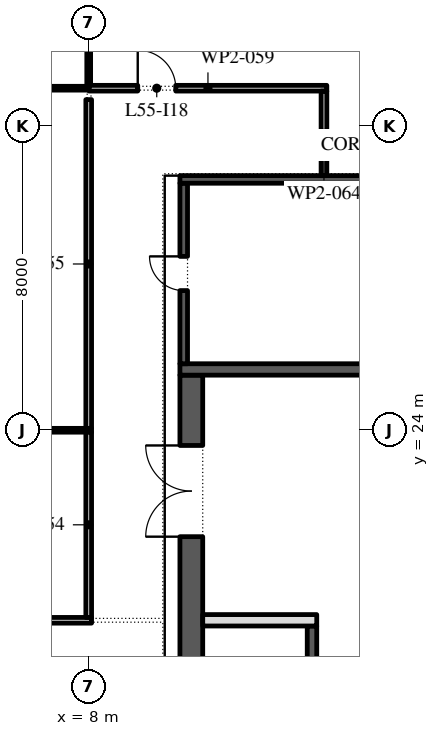
"""IFC4 building model, lengths in metres.
Left out: names, types, materials, properties, quantities, classifications, styles, units other than length and angle.
Written with IfcOpenShell. Run it as: python <this file> out.ifc"""

import sys

from ifc_helpers import new_model, si_unit, direction, frame, frame_2d, origin, place, context, subcontext, project, spatial, rectangle, extrude, element, fill, save


model = new_model("IFC4")
c1 = context("Model", 3, precision=1e-05, world=origin(), true_north=direction((0.0, 1.0)))
c2 = subcontext(c1, "Body", "Model", "MODEL_VIEW")
j1 = project(units=[si_unit("LENGTHUNIT", "METRE"), si_unit("PLANEANGLEUNIT", "RADIAN")], contexts=[c1])
p1 = place(None, origin())
s1 = spatial("IfcSite", under=j1, at=p1, CompositionType="ELEMENT")
p2 = place(p1, origin())
s2 = spatial("IfcBuilding", under=s1, at=p2, CompositionType="ELEMENT")
p3 = place(p2, frame((0.0, 0.0, 255.6)))
s3 = spatial("IfcBuildingStorey", under=s2, at=p3, CompositionType="ELEMENT", Elevation=255.6)
p4 = place(p3, frame((10.7, -2.45, 0.0), z_axis=(0.0, 0.0, 1.0), x_axis=(0.0, 1.0, 0.0)))
e1 = element("IfcWall", 1, at=p4, inside=s3, PredefinedType="SHEAR", context=c2, shape_type="SweptSolid", body=[
    extrude(rectangle(XDim=27.9, YDim=0.6, at=frame_2d((13.95, 0.0))), origin(), (0.0, 0.0, 1.0), 4.0),
])
p5 = place(p4, frame((23.65, 0.0, 0.0)))
e2 = element("IfcOpeningElement", 2, at=p5, cuts=e1, PredefinedType="OPENING", context=c2, shape_type="SweptSolid", body=[
    extrude(rectangle(XDim=2.4, YDim=2.1, at=frame_2d((1.2, 1.05))), frame((0.0, 0.31, 0.0), z_axis=(0.0, -1.0, 0.0), x_axis=(1.0, 0.0, 0.0)), (0.0, 0.0, 1.0), 0.62),
])
p6 = place(p4, frame((1.087, 0.0, 0.0)))
e3 = element("IfcOpeningElement", 3, at=p6, cuts=e1, PredefinedType="OPENING", context=c2, shape_type="SweptSolid", body=[
    extrude(rectangle(XDim=0.9, YDim=2.1, at=frame_2d((0.45, 1.05))), frame((0.0, 0.31, 0.0), z_axis=(0.0, -1.0, 0.0), x_axis=(1.0, 0.0, 0.0)), (0.0, 0.0, 1.0), 0.62),
])
p7 = place(p4, frame((4.262, 0.0, 0.0)))
e4 = element("IfcOpeningElement", 4, at=p7, cuts=e1, PredefinedType="OPENING", context=c2, shape_type="SweptSolid", body=[
    extrude(rectangle(XDim=1.0, YDim=2.1, at=frame_2d((0.5, 1.05))), frame((0.0, 0.31, 0.0), z_axis=(0.0, -1.0, 0.0), x_axis=(1.0, 0.0, 0.0)), (0.0, 0.0, 1.0), 0.62),
])
p8 = place(p3, frame((10.4, 25.6, 0.0), z_axis=(0.0, 0.0, 1.0), x_axis=(1.0, 0.0, 0.0)))
e5 = element("IfcWall", 5, at=p8, inside=s3, PredefinedType="SHEAR", context=c2, shape_type="SweptSolid", body=[
    extrude(rectangle(XDim=11.2, YDim=0.3, at=frame_2d((5.6, 0.0))), origin(), (0.0, 0.0, 1.0), 4.0),
])
p9 = place(p3, frame((13.875, -2.45, 0.0), z_axis=(0.0, 0.0, 1.0), x_axis=(0.0, 1.0, 0.0)))
e6 = element("IfcWall", 6, at=p9, inside=s3, PredefinedType="SHEAR", context=c2, shape_type="SweptSolid", body=[
    extrude(rectangle(XDim=21.3, YDim=0.25, at=frame_2d((10.65, 0.0))), origin(), (0.0, 0.0, 1.0), 4.0),
])
p10 = place(p9, frame((16.261, 0.0, 0.0)))
e7 = element("IfcOpeningElement", 7, at=p10, cuts=e6, PredefinedType="OPENING", context=c2, shape_type="SweptSolid", body=[
    extrude(rectangle(XDim=0.9, YDim=2.1, at=frame_2d((0.45, 1.05))), frame((0.0, 0.135, 0.0), z_axis=(0.0, -1.0, 0.0), x_axis=(1.0, 0.0, 0.0)), (0.0, 0.0, 1.0), 0.27),
])
p11 = place(p9, frame((19.325, 0.0, 0.0)))
e8 = element("IfcOpeningElement", 8, at=p11, cuts=e6, PredefinedType="OPENING", context=c2, shape_type="SweptSolid", body=[
    extrude(rectangle(XDim=0.9, YDim=2.1, at=frame_2d((0.45, 1.05))), frame((0.0, 0.135, 0.0), z_axis=(0.0, -1.0, 0.0), x_axis=(1.0, 0.0, 0.0)), (0.0, 0.0, 1.0), 0.27),
])
p12 = place(p9, frame((6.971, 0.0, 0.0)))
e9 = element("IfcOpeningElement", 9, at=p12, cuts=e6, PredefinedType="OPENING", context=c2, shape_type="SweptSolid", body=[
    extrude(rectangle(XDim=1.1, YDim=2.1, at=frame_2d((0.55, 1.05))), frame((0.0, 0.135, 0.0), z_axis=(0.0, -1.0, 0.0), x_axis=(1.0, 0.0, 0.0)), (0.0, 0.0, 1.0), 0.27),
])
p13 = place(p9, frame((9.114, 0.0, 0.0)))
e10 = element("IfcOpeningElement", 10, at=p13, cuts=e6, PredefinedType="OPENING", context=c2, shape_type="SweptSolid", body=[
    extrude(rectangle(XDim=1.1, YDim=2.1, at=frame_2d((0.55, 1.05))), frame((0.0, 0.135, 0.0), z_axis=(0.0, -1.0, 0.0), x_axis=(1.0, 0.0, 0.0)), (0.0, 0.0, 1.0), 0.27),
])
p14 = place(p9, frame((11.257, 0.0, 0.0)))
e11 = element("IfcOpeningElement", 11, at=p14, cuts=e6, PredefinedType="OPENING", context=c2, shape_type="SweptSolid", body=[
    extrude(rectangle(XDim=1.1, YDim=2.1, at=frame_2d((0.55, 1.05))), frame((0.0, 0.135, 0.0), z_axis=(0.0, -1.0, 0.0), x_axis=(1.0, 0.0, 0.0)), (0.0, 0.0, 1.0), 0.27),
])
p15 = place(p9, frame((13.4, 0.0, 0.0)))
e12 = element("IfcOpeningElement", 12, at=p15, cuts=e6, PredefinedType="OPENING", context=c2, shape_type="SweptSolid", body=[
    extrude(rectangle(XDim=1.1, YDim=2.1, at=frame_2d((0.55, 1.05))), frame((0.0, 0.135, 0.0), z_axis=(0.0, -1.0, 0.0), x_axis=(1.0, 0.0, 0.0)), (0.0, 0.0, 1.0), 0.27),
])
p16 = place(p3, frame((11.0, 19.0, 0.0), z_axis=(0.0, 0.0, 1.0), x_axis=(1.0, 0.0, 0.0)))
e13 = element("IfcWall", 13, at=p16, inside=s3, PredefinedType="PARTITIONING", context=c2, shape_type="SweptSolid", body=[
    extrude(rectangle(XDim=3.0, YDim=0.3, at=frame_2d((1.5, 0.0))), origin(), (0.0, 0.0, 1.0), 4.0),
])
p17 = place(p3, frame((10.5, 25.75, 0.0), z_axis=(0.0, 0.0, 1.0), x_axis=(0.0, 1.0, 0.0)))
e14 = element("IfcWall", 14, at=p17, inside=s3, PredefinedType="SHEAR", context=c2, shape_type="SweptSolid", body=[
    extrude(rectangle(XDim=4.75, YDim=0.2, at=frame_2d((2.375, 0.0))), origin(), (0.0, 0.0, 1.0), 4.0),
])
p18 = place(p17, frame((1.925, 0.0, 0.0)))
e15 = element("IfcOpeningElement", 15, at=p18, cuts=e14, PredefinedType="OPENING", context=c2, shape_type="SweptSolid", body=[
    extrude(rectangle(XDim=0.9, YDim=2.1, at=frame_2d((0.45, 1.05))), frame((0.0, 0.11, 0.0), z_axis=(0.0, -1.0, 0.0), x_axis=(1.0, 0.0, 0.0)), (0.0, 0.0, 1.0), 0.22),
])
p19 = place(p3, frame((10.4, 30.6, 0.0), z_axis=(0.0, 0.0, 1.0), x_axis=(1.0, 0.0, 0.0)))
e16 = element("IfcWall", 16, at=p19, inside=s3, PredefinedType="SHEAR", context=c2, shape_type="SweptSolid", body=[
    extrude(rectangle(XDim=11.2, YDim=0.2, at=frame_2d((5.6, 0.0))), origin(), (0.0, 0.0, 1.0), 4.0),
])
p20 = place(p3, frame((1.025, 19.0, 0.0), z_axis=(0.0, 0.0, 1.0), x_axis=(1.0, 0.0, 0.0)))
e17 = element("IfcWall", 17, at=p20, inside=s3, PredefinedType="PARTITIONING", context=c2, shape_type="SweptSolid", body=[
    extrude(rectangle(XDim=7.05, YDim=0.15, at=frame_2d((3.525, 0.0))), origin(), (0.0, 0.0, 1.0), 4.0),
])
p21 = place(p20, frame((3.825, 0.0, 0.0)))
e18 = element("IfcOpeningElement", 18, at=p21, cuts=e17, PredefinedType="OPENING", context=c2, shape_type="SweptSolid", body=[
    extrude(rectangle(XDim=1.0, YDim=2.1, at=frame_2d((0.5, 1.05))), frame((0.0, 0.085, 0.0), z_axis=(0.0, -1.0, 0.0), x_axis=(1.0, 0.0, 0.0)), (0.0, 0.0, 1.0), 0.17),
])
p22 = place(p3, frame((1.175, 24.0, 0.0), z_axis=(0.0, 0.0, 1.0), x_axis=(1.0, 0.0, 0.0)))
e19 = element("IfcWall", 19, at=p22, inside=s3, PredefinedType="PARTITIONING", context=c2, shape_type="SweptSolid", body=[
    extrude(rectangle(XDim=6.9, YDim=0.1, at=frame_2d((3.45, 0.0))), origin(), (0.0, 0.0, 1.0), 4.0),
])
p23 = place(p3, frame((8.0, 19.075, 0.0), z_axis=(0.0, 0.0, 1.0), x_axis=(0.0, 1.0, 0.0)))
e20 = element("IfcWall", 20, at=p23, inside=s3, PredefinedType="PARTITIONING", context=c2, shape_type="SweptSolid", body=[
    extrude(rectangle(XDim=4.875, YDim=0.15, at=frame_2d((2.438, 0.0))), origin(), (0.0, 0.0, 1.0), 4.0),
])
p24 = place(p3, frame((8.0, 24.05, 0.0), z_axis=(0.0, 0.0, 1.0), x_axis=(0.0, 1.0, 0.0)))
e21 = element("IfcWall", 21, at=p24, inside=s3, PredefinedType="PARTITIONING", context=c2, shape_type="SweptSolid", body=[
    extrude(rectangle(XDim=8.65, YDim=0.15, at=frame_2d((4.325, 0.0))), origin(), (0.0, 0.0, 1.0), 4.0),
])
p25 = place(p3, frame((8.05, 33.0, 0.0), z_axis=(0.0, 0.0, 1.0), x_axis=(-1.0, 0.0, 0.0)))
e22 = element("IfcWall", 22, at=p25, inside=s3, PredefinedType="PARTITIONING", context=c2, shape_type="SweptSolid", body=[
    extrude(rectangle(XDim=6.875, YDim=0.1, at=frame_2d((3.438, 0.0))), origin(), (0.0, 0.0, 1.0), 4.0),
])
p26 = place(p3, frame((8.0, 33.05, 0.0), z_axis=(0.0, 0.0, 1.0), x_axis=(0.0, 1.0, 0.0)))
e23 = element("IfcWall", 23, at=p26, inside=s3, PredefinedType="PARTITIONING", context=c2, shape_type="SweptSolid", body=[
    extrude(rectangle(XDim=6.5, YDim=0.1, at=frame_2d((3.25, 0.0))), origin(), (0.0, 0.0, 1.0), 4.0),
])
p27 = place(p3, frame((8.01, 33.0, 0.0), z_axis=(0.0, 0.0, 1.0), x_axis=(1.0, 0.0, 0.0)))
e24 = element("IfcWall", 24, at=p27, inside=s3, PredefinedType="PARTITIONING", context=c2, shape_type="SweptSolid", body=[
    extrude(rectangle(XDim=6.255, YDim=0.15, at=frame_2d((3.127, 0.0))), origin(), (0.0, 0.0, 1.0), 4.0),
])
p28 = place(p27, frame((1.28, 0.0, 0.0)))
e25 = element("IfcOpeningElement", 25, at=p28, cuts=e24, PredefinedType="OPENING", context=c2, shape_type="SweptSolid", body=[
    extrude(rectangle(XDim=1.0, YDim=2.1, at=frame_2d((0.5, 1.05))), frame((0.0, 0.085, 0.0), z_axis=(0.0, -1.0, 0.0), x_axis=(1.0, 0.0, 0.0)), (0.0, 0.0, 1.0), 0.17),
])
p29 = place(p3, frame((14.19, 32.925, 0.0), z_axis=(0.0, 0.0, 1.0), x_axis=(0.0, -1.0, 0.0)))
e26 = element("IfcWall", 26, at=p29, inside=s3, PredefinedType="PARTITIONING", context=c2, shape_type="SweptSolid", body=[
    extrude(rectangle(XDim=2.225, YDim=0.15, at=frame_2d((1.113, 0.0))), origin(), (0.0, 0.0, 1.0), 4.0),
])
p30 = place(p5, origin())
e27 = element("IfcDoor", 27, at=p30, inside=s3, OperationType="DOUBLE_DOOR_SINGLE_SWING", PredefinedType="DOOR", context=c2, shape_type="SweptSolid", body=[
    extrude(rectangle(XDim=2.4, YDim=2.1, at=frame_2d((1.2, 1.05))), frame((0.0, 0.025, 0.0), z_axis=(0.0, -1.0, 0.0), x_axis=(1.0, 0.0, 0.0)), (0.0, 0.0, 1.0), 0.05),
])
fill(e2, e27)
p31 = place(p18, origin())
e28 = element("IfcDoor", 28, at=p31, inside=s3, OperationType="SINGLE_SWING_LEFT", PredefinedType="DOOR", context=c2, shape_type="SweptSolid", body=[
    extrude(rectangle(XDim=0.9, YDim=2.1, at=frame_2d((0.45, 1.05))), frame((0.0, -0.05, 0.0), z_axis=(0.0, -1.0, 0.0), x_axis=(1.0, 0.0, 0.0)), (0.0, 0.0, 1.0), 0.05),
])
fill(e15, e28)
p32 = place(p28, origin())
e29 = element("IfcDoor", 29, at=p32, inside=s3, OperationType="SINGLE_SWING_RIGHT", PredefinedType="DOOR", context=c2, shape_type="SweptSolid", body=[
    extrude(rectangle(XDim=1.0, YDim=2.1, at=frame_2d((0.5, 1.05))), frame((0.0, 0.025, 0.0), z_axis=(0.0, -1.0, 0.0), x_axis=(1.0, 0.0, 0.0)), (0.0, 0.0, 1.0), 0.05),
])
fill(e25, e29)
save(model, sys.argv[1])
